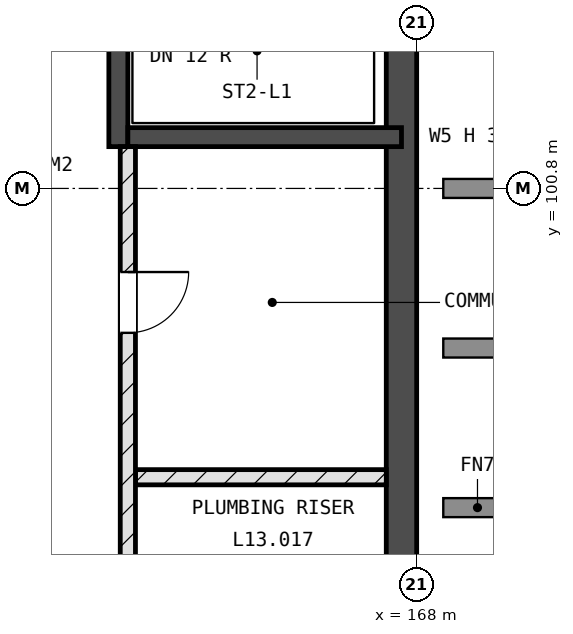
"""IFC4 building model, lengths in metres.
Left out: names, types, materials, properties, quantities, classifications, styles, units other than length and angle.
Written with IfcOpenShell. Run it as: python <this file> out.ifc"""

import sys

from ifc_helpers import new_model, si_unit, direction, frame, frame_2d, origin, place, context, subcontext, project, spatial, rectangle, extrude, element, fill, save


model = new_model("IFC4")
c1 = context("Model", 3, precision=1e-05, world=origin(), true_north=direction((0.0, 1.0)))
c2 = subcontext(c1, "Body", "Model", "MODEL_VIEW")
j1 = project(units=[si_unit("LENGTHUNIT", "METRE"), si_unit("PLANEANGLEUNIT", "RADIAN")], contexts=[c1])
p1 = place(None, origin())
s1 = spatial("IfcSite", under=j1, at=p1, CompositionType="ELEMENT")
p2 = place(p1, origin())
s2 = spatial("IfcBuilding", under=s1, at=p2, CompositionType="ELEMENT")
p3 = place(p2, frame((0.0, 0.0, 50.4)))
s3 = spatial("IfcBuildingStorey", under=s2, at=p3, CompositionType="ELEMENT", Elevation=50.4)
p4 = place(p3, frame((167.8, 92.6, -0.3), z_axis=(0.0, 0.0, 1.0), x_axis=(0.0, 1.0, 0.0)))
e1 = element("IfcWall", 1, at=p4, inside=s3, PredefinedType="SHEAR", context=c2, shape_type="SweptSolid", body=[
    extrude(rectangle(XDim=16.4, YDim=0.4, at=frame_2d((8.2, 0.0))), origin(), (0.0, 0.0, 1.0), 3.6),
])
p5 = place(p4, frame((12.2, 0.0, 1.9)))
e2 = element("IfcOpeningElement", 2, at=p5, cuts=e1, PredefinedType="OPENING", context=c2, shape_type="SweptSolid", body=[
    extrude(rectangle(XDim=1.2, YDim=0.9, at=frame_2d((0.6, 0.45))), frame((0.0, 0.21, 0.0), z_axis=(0.0, -1.0, 0.0), x_axis=(1.0, 0.0, 0.0)), (0.0, 0.0, 1.0), 0.42),
])
p6 = place(p3, frame((164.075, 101.35, -0.3), z_axis=(0.0, 0.0, 1.0), x_axis=(0.0, 1.0, 0.0)))
e3 = element("IfcWall", 3, at=p6, inside=s3, PredefinedType="SHEAR", context=c2, shape_type="SweptSolid", body=[
    extrude(rectangle(XDim=7.65, YDim=0.25, at=frame_2d((3.825, 0.0))), origin(), (0.0, 0.0, 1.0), 3.6),
])
p7 = place(p6, frame((6.55, 0.0, 0.3)))
e4 = element("IfcOpeningElement", 4, at=p7, cuts=e3, PredefinedType="OPENING", context=c2, shape_type="SweptSolid", body=[
    extrude(rectangle(XDim=1.0, YDim=2.1, at=frame_2d((0.5, 1.05))), frame((0.0, 0.135, 0.0), z_axis=(0.0, -1.0, 0.0), x_axis=(1.0, 0.0, 0.0)), (0.0, 0.0, 1.0), 0.27),
])
p8 = place(p3, frame((164.2, 101.475, -0.3), z_axis=(0.0, 0.0, 1.0), x_axis=(1.0, 0.0, 0.0)))
e5 = element("IfcWall", 5, at=p8, inside=s3, PredefinedType="SHEAR", context=c2, shape_type="SweptSolid", body=[
    extrude(rectangle(XDim=3.6, YDim=0.25, at=frame_2d((1.8, 0.0))), origin(), (0.0, 0.0, 1.0), 3.6),
])
p9 = place(p3, frame((164.3, 97.0, 0.0), z_axis=(0.0, 0.0, 1.0), x_axis=(1.0, 0.0, 0.0)))
e6 = element("IfcWall", 6, at=p9, inside=s3, PredefinedType="SOLIDWALL", context=c2, shape_type="SweptSolid", body=[
    extrude(rectangle(XDim=3.3, YDim=0.2, at=frame_2d((1.65, 0.0))), origin(), (0.0, 0.0, 1.0), 3.3),
])
p10 = place(p3, frame((164.2, 92.6, 0.0), z_axis=(0.0, 0.0, 1.0), x_axis=(0.0, 1.0, 0.0)))
e7 = element("IfcWall", 7, at=p10, inside=s3, PredefinedType="SOLIDWALL", context=c2, shape_type="SweptSolid", body=[
    extrude(rectangle(XDim=8.75, YDim=0.2, at=frame_2d((4.375, 0.0))), origin(), (0.0, 0.0, 1.0), 3.3),
])
p11 = place(p10, frame((1.7, 0.0, 0.0)))
e8 = element("IfcOpeningElement", 8, at=p11, cuts=e7, PredefinedType="OPENING", context=c2, shape_type="SweptSolid", body=[
    extrude(rectangle(XDim=0.8, YDim=2.1, at=frame_2d((0.4, 1.05))), frame((0.0, 0.11, 0.0), z_axis=(0.0, -1.0, 0.0), x_axis=(1.0, 0.0, 0.0)), (0.0, 0.0, 1.0), 0.22),
])
p12 = place(p10, frame((6.3, 0.0, 0.0)))
e9 = element("IfcOpeningElement", 9, at=p12, cuts=e7, PredefinedType="OPENING", context=c2, shape_type="SweptSolid", body=[
    extrude(rectangle(XDim=0.8, YDim=2.1, at=frame_2d((0.4, 1.05))), frame((0.0, 0.11, 0.0), z_axis=(0.0, -1.0, 0.0), x_axis=(1.0, 0.0, 0.0)), (0.0, 0.0, 1.0), 0.22),
])
p13 = place(p12, origin())
e10 = element("IfcDoor", 10, at=p13, inside=s3, OperationType="SINGLE_SWING_RIGHT", PredefinedType="DOOR", context=c2, shape_type="SweptSolid", body=[
    extrude(rectangle(XDim=0.8, YDim=2.1, at=frame_2d((0.4, 1.05))), frame((0.0, 0.025, 0.0), z_axis=(0.0, -1.0, 0.0), x_axis=(1.0, 0.0, 0.0)), (0.0, 0.0, 1.0), 0.05),
])
fill(e9, e10)
save(model, sys.argv[1])
